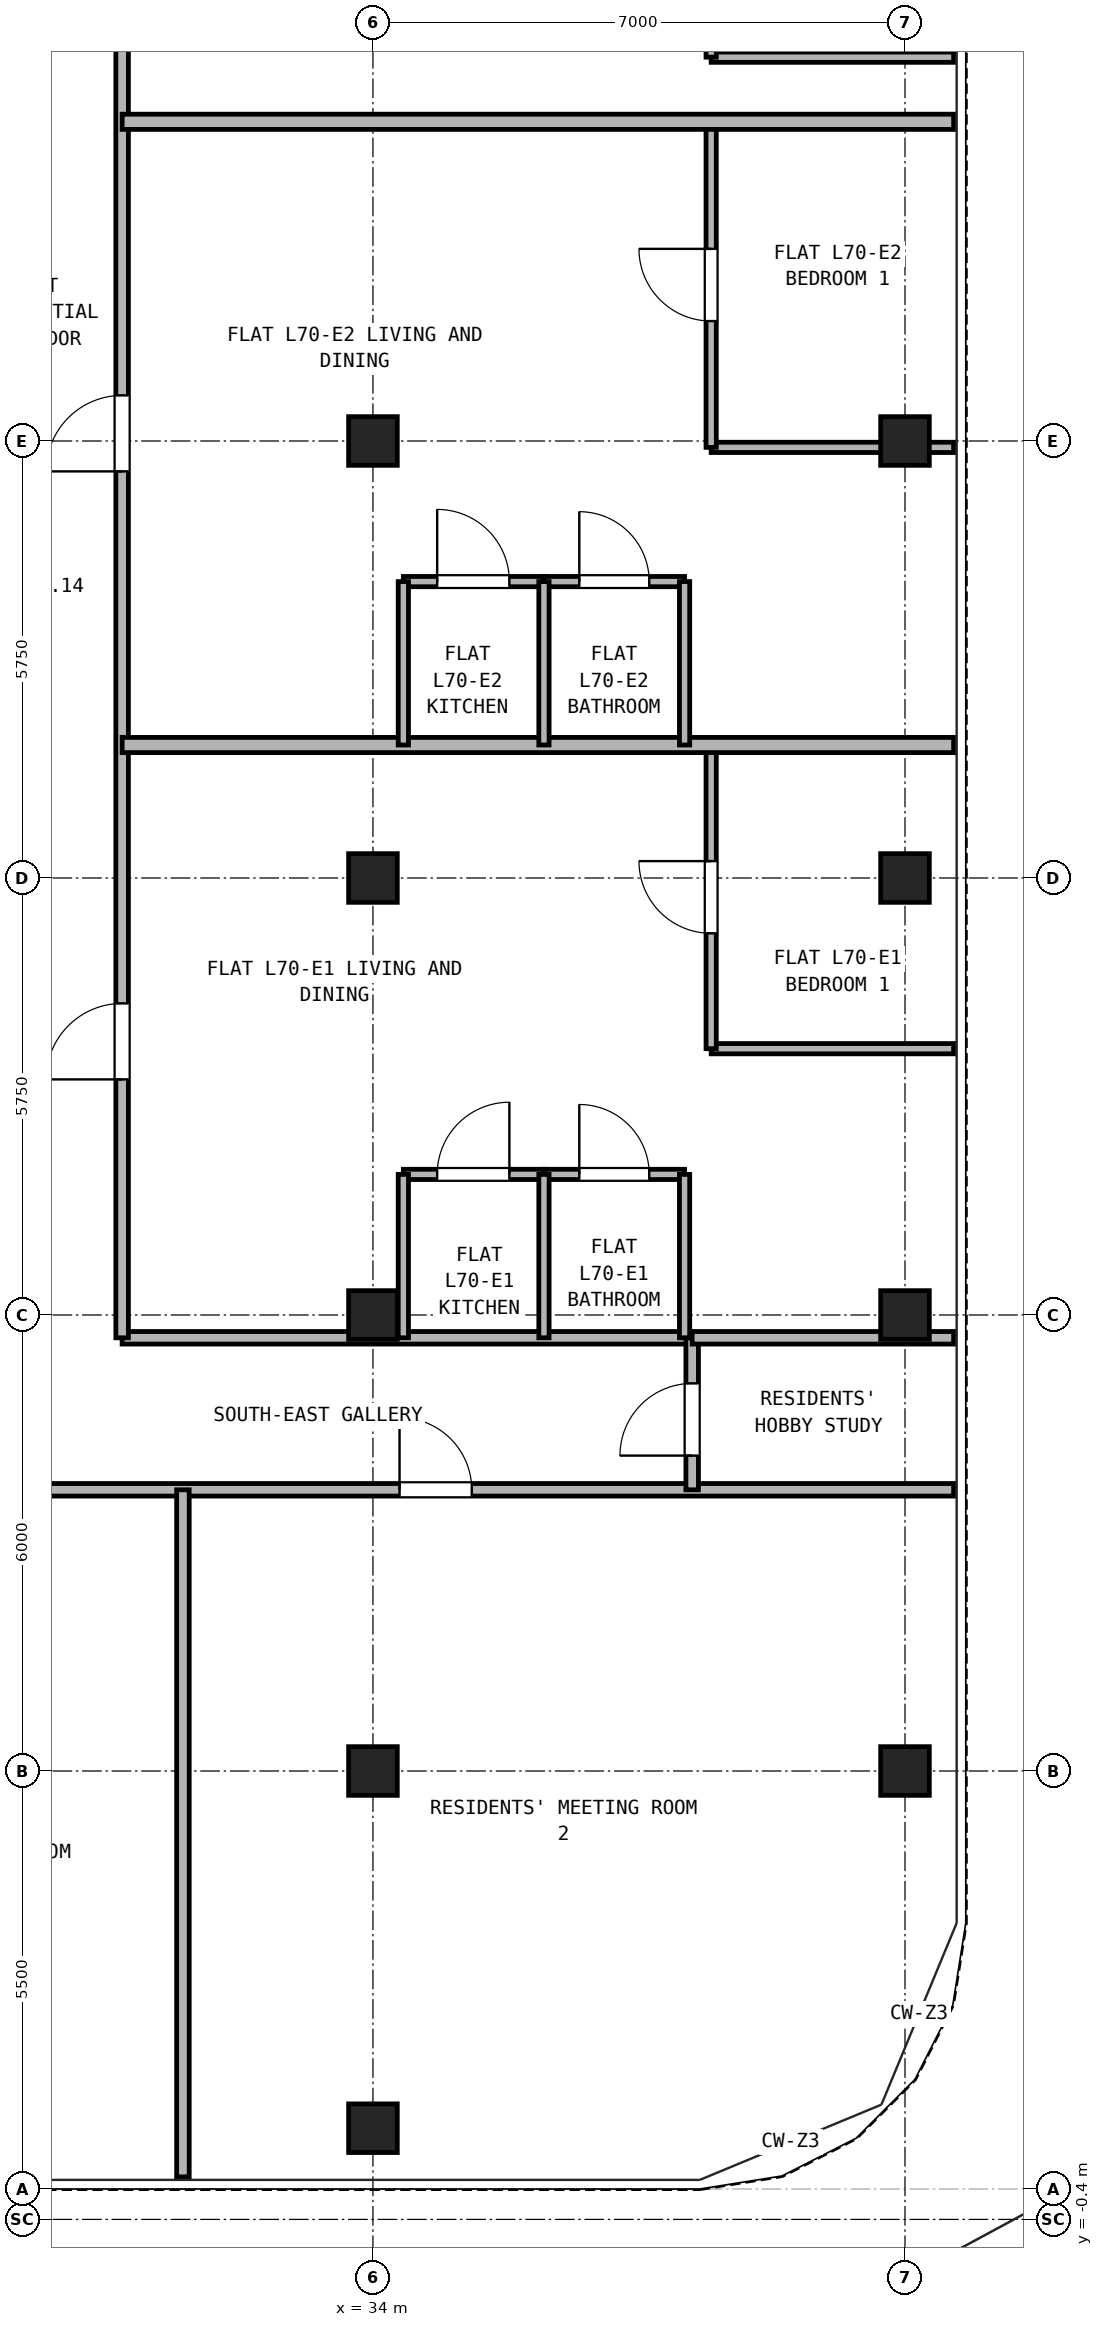
"""IFC4 building model, lengths in metres.
Left out: names, types, materials, properties, quantities, classifications, styles, units other than length and angle.
Written with IfcOpenShell. Run it as: python <this file> out.ifc"""

import sys

from ifc_helpers import new_model, si_unit, direction, frame, frame_2d, origin, origin_2d, place, context, subcontext, project, spatial, rectangle, hollow_rectangle, extrude, source, transform, mapped, element, fill, save


model = new_model("IFC4")
c1 = context("Model", 3, precision=1e-05, world=origin(), true_north=direction((0.0, 1.0)))
c2 = subcontext(c1, "Body", "Model", "MODEL_VIEW")
j1 = project(units=[si_unit("LENGTHUNIT", "METRE"), si_unit("PLANEANGLEUNIT", "RADIAN")], contexts=[c1])
p1 = place(None, origin())
s1 = spatial("IfcSite", under=j1, at=p1, CompositionType="ELEMENT")
p2 = place(p1, origin())
s2 = spatial("IfcBuilding", under=s1, at=p2, CompositionType="ELEMENT")
p3 = place(p2, frame((0.0, 0.0, 245.7)))
s3 = spatial("IfcBuildingStorey", under=s2, at=p3, CompositionType="ELEMENT", Elevation=245.7)
m1 = source(origin(), c2, "Body", "SweptSolid", [
    extrude(hollow_rectangle(XDim=0.64, YDim=0.64, WallThickness=0.035, at=origin_2d()), origin(), (0.0, 0.0, 1.0), 2.98),
])
for number, where, z_axis, x_axis in (
    (1, (34.0, 0.8, 0.0), (0.0, 0.0, 1.0), (1.0, 0.0, 0.0)),
    (2, (41.0, 5.5, 0.0), (0.0, 0.0, 1.0), (1.0, 0.0, 0.0)),
    (3, (41.0, 11.5, 0.0), (0.0, 0.0, 1.0), (1.0, 0.0, 0.0)),
    (4, (41.0, 17.25, 0.0), (0.0, 0.0, 1.0), (1.0, 0.0, 0.0)),
    (5, (41.0, 23.0, 0.0), (0.0, 0.0, 1.0), (1.0, 0.0, 0.0)),
    (6, (34.0, 5.5, 0.0), (0.0, 0.0, 1.0), (1.0, 0.0, 0.0)),
    (7, (34.0, 11.5, 0.0), (0.0, 0.0, 1.0), (1.0, 0.0, 0.0)),
    (8, (34.0, 17.25, 0.0), (0.0, 0.0, 1.0), (1.0, 0.0, 0.0)),
    (9, (34.0, 23.0, 0.0), (0.0, 0.0, 1.0), (1.0, 0.0, 0.0)),
):
    element("IfcColumn", number, at=place(p3, frame(where, z_axis=z_axis, x_axis=x_axis)), inside=s3, PredefinedType="COLUMN", context=c2, shape_type="MappedRepresentation", body=[
        mapped(m1, transform((0.0, 0.0, 0.0), x_axis=(1.0, 0.0, 0.0), y_axis=(0.0, 1.0, 0.0), z_axis=(0.0, 0.0, 1.0), scale=1.0)),
    ])
p4 = place(p3, frame((5.36, 9.2, 0.0), z_axis=(0.0, 0.0, 1.0), x_axis=(1.0, 0.0, 0.0)))
e10 = element("IfcWall", 10, at=p4, inside=s3, PredefinedType="PARTITIONING", context=c2, shape_type="SweptSolid", body=[
    extrude(rectangle(XDim=36.28, YDim=0.165, at=frame_2d((18.14, 0.0))), origin(), (0.0, 0.0, 1.0), 2.98),
])
p5 = place(p4, frame((7.17, 0.0, 0.0)))
e11 = element("IfcOpeningElement", 11, at=p5, cuts=e10, PredefinedType="OPENING", context=c2, shape_type="SweptSolid", body=[
    extrude(rectangle(XDim=0.95, YDim=2.15, at=frame_2d((0.475, 1.075))), frame((0.0, 0.093, 0.0), z_axis=(0.0, -1.0, 0.0), x_axis=(1.0, 0.0, 0.0)), (0.0, 0.0, 1.0), 0.185),
])
p6 = place(p4, frame((15.39, 0.0, 0.0)))
e12 = element("IfcOpeningElement", 12, at=p6, cuts=e10, PredefinedType="OPENING", context=c2, shape_type="SweptSolid", body=[
    extrude(rectangle(XDim=0.95, YDim=2.15, at=frame_2d((0.475, 1.075))), frame((0.0, 0.093, 0.0), z_axis=(0.0, -1.0, 0.0), x_axis=(1.0, 0.0, 0.0)), (0.0, 0.0, 1.0), 0.185),
])
p7 = place(p4, frame((22.39, 0.0, 0.0)))
e13 = element("IfcOpeningElement", 13, at=p7, cuts=e10, PredefinedType="OPENING", context=c2, shape_type="SweptSolid", body=[
    extrude(rectangle(XDim=0.95, YDim=2.15, at=frame_2d((0.475, 1.075))), frame((0.0, 0.093, 0.0), z_axis=(0.0, -1.0, 0.0), x_axis=(1.0, 0.0, 0.0)), (0.0, 0.0, 1.0), 0.185),
])
p8 = place(p4, frame((28.99, 0.0, 0.0)))
e14 = element("IfcOpeningElement", 14, at=p8, cuts=e10, PredefinedType="OPENING", context=c2, shape_type="SweptSolid", body=[
    extrude(rectangle(XDim=0.95, YDim=2.15, at=frame_2d((0.475, 1.075))), frame((0.0, 0.093, 0.0), z_axis=(0.0, -1.0, 0.0), x_axis=(1.0, 0.0, 0.0)), (0.0, 0.0, 1.0), 0.185),
])
p9 = place(p3, frame((30.7, 11.2, 0.0), z_axis=(0.0, 0.0, 1.0), x_axis=(1.0, 0.0, 0.0)))
e15 = element("IfcWall", 15, at=p9, inside=s3, PredefinedType="PARTITIONING", context=c2, shape_type="SweptSolid", body=[
    extrude(rectangle(XDim=7.5, YDim=0.165, at=frame_2d((3.75, 0.0))), origin(), (0.0, 0.0, 1.0), 2.98),
])
p10 = place(p3, frame((38.2, 9.2, 0.0), z_axis=(0.0, 0.0, 1.0), x_axis=(0.0, 1.0, 0.0)))
e16 = element("IfcWall", 16, at=p10, inside=s3, PredefinedType="PARTITIONING", context=c2, shape_type="SweptSolid", body=[
    extrude(rectangle(XDim=2.0, YDim=0.165, at=frame_2d((1.0, 0.0))), origin(), (0.0, 0.0, 1.0), 2.98),
])
p11 = place(p10, frame((0.45, 0.0, 0.0)))
e17 = element("IfcOpeningElement", 17, at=p11, cuts=e16, PredefinedType="OPENING", context=c2, shape_type="SweptSolid", body=[
    extrude(rectangle(XDim=0.95, YDim=2.15, at=frame_2d((0.475, 1.075))), frame((0.0, 0.093, 0.0), z_axis=(0.0, -1.0, 0.0), x_axis=(1.0, 0.0, 0.0)), (0.0, 0.0, 1.0), 0.185),
])
p12 = place(p3, frame((30.7, 11.2, 0.0), z_axis=(0.0, 0.0, 1.0), x_axis=(0.0, 1.0, 0.0)))
e18 = element("IfcWall", 18, at=p12, inside=s3, PredefinedType="PARTITIONING", context=c2, shape_type="SweptSolid", body=[
    extrude(rectangle(XDim=23.94, YDim=0.165, at=frame_2d((11.97, 0.0))), origin(), (0.0, 0.0, 1.0), 2.98),
])
p13 = place(p12, frame((3.4, 0.0, 0.0)))
e19 = element("IfcOpeningElement", 19, at=p13, cuts=e18, PredefinedType="OPENING", context=c2, shape_type="SweptSolid", body=[
    extrude(rectangle(XDim=1.0, YDim=2.15, at=frame_2d((0.5, 1.075))), frame((0.0, 0.093, 0.0), z_axis=(0.0, -1.0, 0.0), x_axis=(1.0, 0.0, 0.0)), (0.0, 0.0, 1.0), 0.185),
])
p14 = place(p12, frame((11.4, 0.0, 0.0)))
e20 = element("IfcOpeningElement", 20, at=p14, cuts=e18, PredefinedType="OPENING", context=c2, shape_type="SweptSolid", body=[
    extrude(rectangle(XDim=1.0, YDim=2.15, at=frame_2d((0.5, 1.075))), frame((0.0, 0.093, 0.0), z_axis=(0.0, -1.0, 0.0), x_axis=(1.0, 0.0, 0.0)), (0.0, 0.0, 1.0), 0.185),
])
p15 = place(p12, frame((17.05, 0.0, 0.0)))
e21 = element("IfcOpeningElement", 21, at=p15, cuts=e18, PredefinedType="OPENING", context=c2, shape_type="SweptSolid", body=[
    extrude(rectangle(XDim=1.0, YDim=2.15, at=frame_2d((0.5, 1.075))), frame((0.0, 0.093, 0.0), z_axis=(0.0, -1.0, 0.0), x_axis=(1.0, 0.0, 0.0)), (0.0, 0.0, 1.0), 0.185),
])
p16 = place(p3, frame((31.5, 0.16, 0.0), z_axis=(0.0, 0.0, 1.0), x_axis=(0.0, 1.0, 0.0)))
e22 = element("IfcWall", 22, at=p16, inside=s3, PredefinedType="PARTITIONING", context=c2, shape_type="SweptSolid", body=[
    extrude(rectangle(XDim=9.04, YDim=0.165, at=frame_2d((4.52, 0.0))), origin(), (0.0, 0.0, 1.0), 2.98),
])
p17 = place(p3, frame((38.2, 11.2, 0.0), z_axis=(0.0, 0.0, 1.0), x_axis=(1.0, 0.0, 0.0)))
e23 = element("IfcWall", 23, at=p17, inside=s3, PredefinedType="PARTITIONING", context=c2, shape_type="SweptSolid", body=[
    extrude(rectangle(XDim=3.44, YDim=0.165, at=frame_2d((1.72, 0.0))), origin(), (0.0, 0.0, 1.0), 2.98),
])
p18 = place(p3, frame((34.4, 13.35, 0.0), z_axis=(0.0, 0.0, 1.0), x_axis=(1.0, 0.0, 0.0)))
e24 = element("IfcWall", 24, at=p18, inside=s3, PredefinedType="PARTITIONING", context=c2, shape_type="SweptSolid", body=[
    extrude(rectangle(XDim=1.85, YDim=0.135, at=frame_2d((0.925, 0.0))), origin(), (0.0, 0.0, 1.0), 2.98),
])
p19 = place(p18, frame((0.445, 0.0, 0.0)))
e25 = element("IfcOpeningElement", 25, at=p19, cuts=e24, PredefinedType="OPENING", context=c2, shape_type="SweptSolid", body=[
    extrude(rectangle(XDim=0.95, YDim=2.15, at=frame_2d((0.475, 1.075))), frame((0.0, 0.077, 0.0), z_axis=(0.0, -1.0, 0.0), x_axis=(1.0, 0.0, 0.0)), (0.0, 0.0, 1.0), 0.155),
])
p20 = place(p3, frame((36.25, 13.35, 0.0), z_axis=(0.0, 0.0, 1.0), x_axis=(1.0, 0.0, 0.0)))
e26 = element("IfcWall", 26, at=p20, inside=s3, PredefinedType="PARTITIONING", context=c2, shape_type="SweptSolid", body=[
    extrude(rectangle(XDim=1.85, YDim=0.135, at=frame_2d((0.925, 0.0))), origin(), (0.0, 0.0, 1.0), 2.98),
])
p21 = place(p20, frame((0.465, 0.0, 0.0)))
e27 = element("IfcOpeningElement", 27, at=p21, cuts=e26, PredefinedType="OPENING", context=c2, shape_type="SweptSolid", body=[
    extrude(rectangle(XDim=0.92, YDim=2.1, at=frame_2d((0.46, 1.05))), frame((0.0, 0.077, 0.0), z_axis=(0.0, -1.0, 0.0), x_axis=(1.0, 0.0, 0.0)), (0.0, 0.0, 1.0), 0.155),
])
for number, where, z_axis, x_axis in (
    (28, (34.4, 11.2, 0.0), (0.0, 0.0, 1.0), (0.0, 1.0, 0.0)),
    (29, (36.25, 11.2, 0.0), (0.0, 0.0, 1.0), (0.0, 1.0, 0.0)),
    (30, (38.1, 11.2, 0.0), (0.0, 0.0, 1.0), (0.0, 1.0, 0.0)),
):
    element("IfcWall", number, at=place(p3, frame(where, z_axis=z_axis, x_axis=x_axis)), inside=s3, PredefinedType="PARTITIONING", context=c2, shape_type="SweptSolid", body=[
        extrude(rectangle(XDim=2.15, YDim=0.135, at=frame_2d((1.075, 0.0))), origin(), (0.0, 0.0, 1.0), 2.98),
    ])
p22 = place(p3, frame((38.45, 15.004, 0.0), z_axis=(0.0, 0.0, 1.0), x_axis=(1.0, 0.0, 0.0)))
e31 = element("IfcWall", 31, at=p22, inside=s3, PredefinedType="PARTITIONING", context=c2, shape_type="SweptSolid", body=[
    extrude(rectangle(XDim=3.19, YDim=0.135, at=frame_2d((1.595, 0.0))), origin(), (0.0, 0.0, 1.0), 2.98),
])
p23 = place(p3, frame((38.45, 15.004, 0.0), z_axis=(0.0, 0.0, 1.0), x_axis=(0.0, 1.0, 0.0)))
e32 = element("IfcWall", 32, at=p23, inside=s3, PredefinedType="PARTITIONING", context=c2, shape_type="SweptSolid", body=[
    extrude(rectangle(XDim=3.996, YDim=0.135, at=frame_2d((1.998, 0.0))), origin(), (0.0, 0.0, 1.0), 2.98),
])
p24 = place(p23, frame((1.518, 0.0, 0.0)))
e33 = element("IfcOpeningElement", 33, at=p24, cuts=e32, PredefinedType="OPENING", context=c2, shape_type="SweptSolid", body=[
    extrude(rectangle(XDim=0.95, YDim=2.15, at=frame_2d((0.475, 1.075))), frame((0.0, 0.077, 0.0), z_axis=(0.0, -1.0, 0.0), x_axis=(1.0, 0.0, 0.0)), (0.0, 0.0, 1.0), 0.155),
])
p25 = place(p3, frame((30.7, 19.0, 0.0), z_axis=(0.0, 0.0, 1.0), x_axis=(1.0, 0.0, 0.0)))
e34 = element("IfcWall", 34, at=p25, inside=s3, PredefinedType="PARTITIONING", context=c2, shape_type="SweptSolid", body=[
    extrude(rectangle(XDim=10.94, YDim=0.2, at=frame_2d((5.47, 0.0))), origin(), (0.0, 0.0, 1.0), 2.98),
])
p26 = place(p3, frame((34.4, 21.15, 0.0), z_axis=(0.0, 0.0, 1.0), x_axis=(1.0, 0.0, 0.0)))
e35 = element("IfcWall", 35, at=p26, inside=s3, PredefinedType="PARTITIONING", context=c2, shape_type="SweptSolid", body=[
    extrude(rectangle(XDim=1.85, YDim=0.135, at=frame_2d((0.925, 0.0))), origin(), (0.0, 0.0, 1.0), 2.98),
])
p27 = place(p26, frame((0.445, 0.0, 0.0)))
e36 = element("IfcOpeningElement", 36, at=p27, cuts=e35, PredefinedType="OPENING", context=c2, shape_type="SweptSolid", body=[
    extrude(rectangle(XDim=0.95, YDim=2.15, at=frame_2d((0.475, 1.075))), frame((0.0, 0.077, 0.0), z_axis=(0.0, -1.0, 0.0), x_axis=(1.0, 0.0, 0.0)), (0.0, 0.0, 1.0), 0.155),
])
p28 = place(p3, frame((36.25, 21.15, 0.0), z_axis=(0.0, 0.0, 1.0), x_axis=(1.0, 0.0, 0.0)))
e37 = element("IfcWall", 37, at=p28, inside=s3, PredefinedType="PARTITIONING", context=c2, shape_type="SweptSolid", body=[
    extrude(rectangle(XDim=1.85, YDim=0.135, at=frame_2d((0.925, 0.0))), origin(), (0.0, 0.0, 1.0), 2.98),
])
p29 = place(p28, frame((0.465, 0.0, 0.0)))
e38 = element("IfcOpeningElement", 38, at=p29, cuts=e37, PredefinedType="OPENING", context=c2, shape_type="SweptSolid", body=[
    extrude(rectangle(XDim=0.92, YDim=2.1, at=frame_2d((0.46, 1.05))), frame((0.0, 0.077, 0.0), z_axis=(0.0, -1.0, 0.0), x_axis=(1.0, 0.0, 0.0)), (0.0, 0.0, 1.0), 0.155),
])
for number, where, z_axis, x_axis in (
    (39, (34.4, 19.0, 0.0), (0.0, 0.0, 1.0), (0.0, 1.0, 0.0)),
    (40, (36.25, 19.0, 0.0), (0.0, 0.0, 1.0), (0.0, 1.0, 0.0)),
    (41, (38.1, 19.0, 0.0), (0.0, 0.0, 1.0), (0.0, 1.0, 0.0)),
):
    element("IfcWall", number, at=place(p3, frame(where, z_axis=z_axis, x_axis=x_axis)), inside=s3, PredefinedType="PARTITIONING", context=c2, shape_type="SweptSolid", body=[
        extrude(rectangle(XDim=2.15, YDim=0.135, at=frame_2d((1.075, 0.0))), origin(), (0.0, 0.0, 1.0), 2.98),
    ])
p30 = place(p3, frame((38.45, 22.916, 0.0), z_axis=(0.0, 0.0, 1.0), x_axis=(1.0, 0.0, 0.0)))
e42 = element("IfcWall", 42, at=p30, inside=s3, PredefinedType="PARTITIONING", context=c2, shape_type="SweptSolid", body=[
    extrude(rectangle(XDim=3.19, YDim=0.135, at=frame_2d((1.595, 0.0))), origin(), (0.0, 0.0, 1.0), 2.428),
])
p31 = place(p3, frame((38.45, 22.916, 0.0), z_axis=(0.0, 0.0, 1.0), x_axis=(0.0, 1.0, 0.0)))
e43 = element("IfcWall", 43, at=p31, inside=s3, PredefinedType="PARTITIONING", context=c2, shape_type="SweptSolid", body=[
    extrude(rectangle(XDim=4.284, YDim=0.135, at=frame_2d((2.142, 0.0))), origin(), (0.0, 0.0, 1.0), 2.98),
])
p32 = place(p31, frame((1.662, 0.0, 0.0)))
e44 = element("IfcOpeningElement", 44, at=p32, cuts=e43, PredefinedType="OPENING", context=c2, shape_type="SweptSolid", body=[
    extrude(rectangle(XDim=0.95, YDim=2.15, at=frame_2d((0.475, 1.075))), frame((0.0, 0.077, 0.0), z_axis=(0.0, -1.0, 0.0), x_axis=(1.0, 0.0, 0.0)), (0.0, 0.0, 1.0), 0.155),
])
p33 = place(p3, frame((30.7, 27.2, 0.0), z_axis=(0.0, 0.0, 1.0), x_axis=(1.0, 0.0, 0.0)))
e45 = element("IfcWall", 45, at=p33, inside=s3, PredefinedType="PARTITIONING", context=c2, shape_type="SweptSolid", body=[
    extrude(rectangle(XDim=10.94, YDim=0.2, at=frame_2d((5.47, 0.0))), origin(), (0.0, 0.0, 1.0), 2.98),
])
p34 = place(p3, frame((38.45, 28.05, 0.0), z_axis=(0.0, 0.0, 1.0), x_axis=(1.0, 0.0, 0.0)))
e46 = element("IfcWall", 46, at=p34, inside=s3, PredefinedType="PARTITIONING", context=c2, shape_type="SweptSolid", body=[
    extrude(rectangle(XDim=3.19, YDim=0.135, at=frame_2d((1.595, 0.0))), origin(), (0.0, 0.0, 1.0), 2.98),
])
p35 = place(p3, frame((38.45, 28.05, 0.0), z_axis=(0.0, 0.0, 1.0), x_axis=(0.0, 1.0, 0.0)))
e47 = element("IfcWall", 47, at=p35, inside=s3, PredefinedType="PARTITIONING", context=c2, shape_type="SweptSolid", body=[
    extrude(rectangle(XDim=3.4, YDim=0.135, at=frame_2d((1.7, 0.0))), origin(), (0.0, 0.0, 1.0), 2.98),
])
p36 = place(p35, frame((1.22, 0.0, 0.0)))
e48 = element("IfcOpeningElement", 48, at=p36, cuts=e47, PredefinedType="OPENING", context=c2, shape_type="SweptSolid", body=[
    extrude(rectangle(XDim=0.95, YDim=2.15, at=frame_2d((0.475, 1.075))), frame((0.0, 0.077, 0.0), z_axis=(0.0, -1.0, 0.0), x_axis=(1.0, 0.0, 0.0)), (0.0, 0.0, 1.0), 0.155),
])
p37 = place(p8, frame((0.95, 0.0, 0.0), z_axis=(0.0, 0.0, 1.0), x_axis=(-1.0, 0.0, 0.0)))
e49 = element("IfcDoor", 49, at=p37, inside=s3, OperationType="SINGLE_SWING_LEFT", PredefinedType="DOOR", context=c2, shape_type="SweptSolid", body=[
    extrude(rectangle(XDim=0.95, YDim=2.15, at=frame_2d((0.475, 1.075))), frame((0.0, 0.025, 0.0), z_axis=(0.0, -1.0, 0.0), x_axis=(1.0, 0.0, 0.0)), (0.0, 0.0, 1.0), 0.05),
])
fill(e14, e49)
p38 = place(p11, origin())
e50 = element("IfcDoor", 50, at=p38, inside=s3, OperationType="SINGLE_SWING_LEFT", PredefinedType="DOOR", context=c2, shape_type="SweptSolid", body=[
    extrude(rectangle(XDim=0.95, YDim=2.15, at=frame_2d((0.475, 1.075))), frame((0.0, 0.025, 0.0), z_axis=(0.0, -1.0, 0.0), x_axis=(1.0, 0.0, 0.0)), (0.0, 0.0, 1.0), 0.05),
])
fill(e17, e50)
p39 = place(p19, origin())
e51 = element("IfcDoor", 51, at=p39, inside=s3, OperationType="SINGLE_SWING_RIGHT", PredefinedType="DOOR", context=c2, shape_type="SweptSolid", body=[
    extrude(rectangle(XDim=0.95, YDim=2.15, at=frame_2d((0.475, 1.075))), frame((0.0, 0.025, 0.0), z_axis=(0.0, -1.0, 0.0), x_axis=(1.0, 0.0, 0.0)), (0.0, 0.0, 1.0), 0.05),
])
fill(e25, e51)
p40 = place(p21, origin())
e52 = element("IfcDoor", 52, at=p40, inside=s3, OperationType="SINGLE_SWING_LEFT", PredefinedType="DOOR", context=c2, shape_type="SweptSolid", body=[
    extrude(rectangle(XDim=0.92, YDim=2.1, at=frame_2d((0.46, 1.05))), frame((0.0, 0.025, 0.0), z_axis=(0.0, -1.0, 0.0), x_axis=(1.0, 0.0, 0.0)), (0.0, 0.0, 1.0), 0.05),
])
fill(e27, e52)
p41 = place(p24, frame((0.95, 0.0, 0.0), z_axis=(0.0, 0.0, 1.0), x_axis=(-1.0, 0.0, 0.0)))
e53 = element("IfcDoor", 53, at=p41, inside=s3, OperationType="SINGLE_SWING_RIGHT", PredefinedType="DOOR", context=c2, shape_type="SweptSolid", body=[
    extrude(rectangle(XDim=0.95, YDim=2.15, at=frame_2d((0.475, 1.075))), frame((0.0, 0.025, 0.0), z_axis=(0.0, -1.0, 0.0), x_axis=(1.0, 0.0, 0.0)), (0.0, 0.0, 1.0), 0.05),
])
fill(e33, e53)
p42 = place(p13, frame((1.0, 0.0, 0.0), z_axis=(0.0, 0.0, 1.0), x_axis=(-1.0, 0.0, 0.0)))
e54 = element("IfcDoor", 54, at=p42, inside=s3, OperationType="SINGLE_SWING_LEFT", PredefinedType="DOOR", context=c2, shape_type="SweptSolid", body=[
    extrude(rectangle(XDim=1.0, YDim=2.15, at=frame_2d((0.5, 1.075))), frame((0.0, 0.025, 0.0), z_axis=(0.0, -1.0, 0.0), x_axis=(1.0, 0.0, 0.0)), (0.0, 0.0, 1.0), 0.05),
])
fill(e19, e54)
p43 = place(p27, origin())
e55 = element("IfcDoor", 55, at=p43, inside=s3, OperationType="SINGLE_SWING_LEFT", PredefinedType="DOOR", context=c2, shape_type="SweptSolid", body=[
    extrude(rectangle(XDim=0.95, YDim=2.15, at=frame_2d((0.475, 1.075))), frame((0.0, 0.025, 0.0), z_axis=(0.0, -1.0, 0.0), x_axis=(1.0, 0.0, 0.0)), (0.0, 0.0, 1.0), 0.05),
])
fill(e36, e55)
p44 = place(p29, origin())
e56 = element("IfcDoor", 56, at=p44, inside=s3, OperationType="SINGLE_SWING_LEFT", PredefinedType="DOOR", context=c2, shape_type="SweptSolid", body=[
    extrude(rectangle(XDim=0.92, YDim=2.1, at=frame_2d((0.46, 1.05))), frame((0.0, 0.025, 0.0), z_axis=(0.0, -1.0, 0.0), x_axis=(1.0, 0.0, 0.0)), (0.0, 0.0, 1.0), 0.05),
])
fill(e38, e56)
p45 = place(p32, frame((0.95, 0.0, 0.0), z_axis=(0.0, 0.0, 1.0), x_axis=(-1.0, 0.0, 0.0)))
e57 = element("IfcDoor", 57, at=p45, inside=s3, OperationType="SINGLE_SWING_RIGHT", PredefinedType="DOOR", context=c2, shape_type="SweptSolid", body=[
    extrude(rectangle(XDim=0.95, YDim=2.15, at=frame_2d((0.475, 1.075))), frame((0.0, 0.025, 0.0), z_axis=(0.0, -1.0, 0.0), x_axis=(1.0, 0.0, 0.0)), (0.0, 0.0, 1.0), 0.05),
])
fill(e44, e57)
p46 = place(p14, frame((1.0, 0.0, 0.0), z_axis=(0.0, 0.0, 1.0), x_axis=(-1.0, 0.0, 0.0)))
e58 = element("IfcDoor", 58, at=p46, inside=s3, OperationType="SINGLE_SWING_LEFT", PredefinedType="DOOR", context=c2, shape_type="SweptSolid", body=[
    extrude(rectangle(XDim=1.0, YDim=2.15, at=frame_2d((0.5, 1.075))), frame((0.0, 0.025, 0.0), z_axis=(0.0, -1.0, 0.0), x_axis=(1.0, 0.0, 0.0)), (0.0, 0.0, 1.0), 0.05),
])
fill(e20, e58)
save(model, sys.argv[1])
